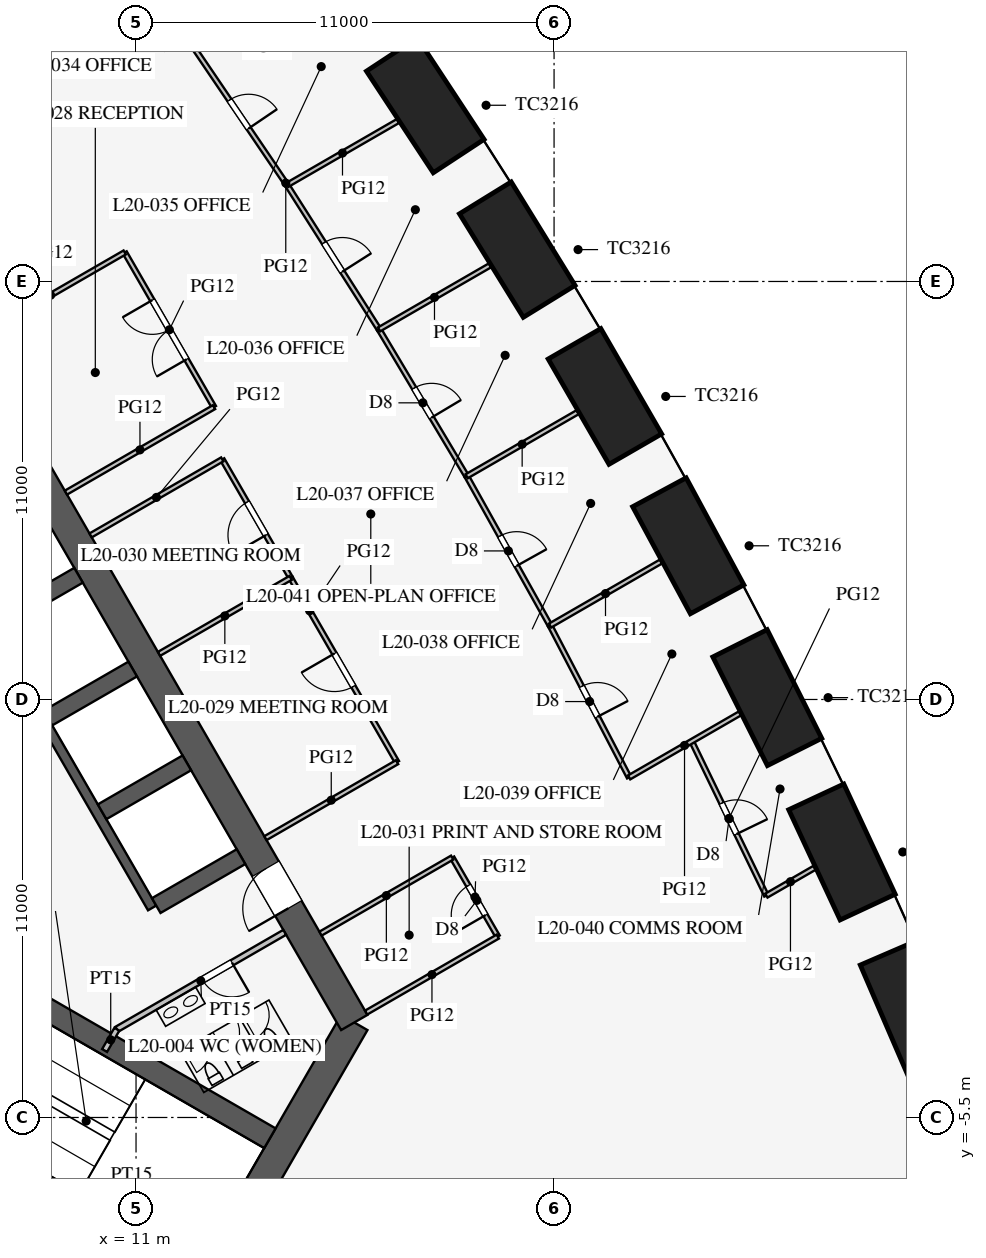
"""IFC4 building model, lengths in metres.
Left out: names, types, materials, properties, quantities, classifications, styles, units other than length and angle.
Written with IfcOpenShell. Run it as: python <this file> out.ifc"""

import sys

from ifc_helpers import new_model, si_unit, direction, frame, frame_2d, origin, origin_2d, place, context, subcontext, project, spatial, rectangle, extrude, element, fill, save


model = new_model("IFC4")
c1 = context("Model", 3, precision=1e-05, world=origin(), true_north=direction((0.0, 1.0)))
c2 = subcontext(c1, "Body", "Model", "MODEL_VIEW")
j1 = project(units=[si_unit("LENGTHUNIT", "METRE"), si_unit("PLANEANGLEUNIT", "RADIAN")], contexts=[c1])
p1 = place(None, origin())
s1 = spatial("IfcSite", under=j1, at=p1, CompositionType="ELEMENT")
p2 = place(p1, origin())
s2 = spatial("IfcBuilding", under=s1, at=p2, CompositionType="ELEMENT")
p3 = place(p2, frame((0.0, 0.0, 87.9)))
s3 = spatial("IfcBuildingStorey", under=s2, at=p3, CompositionType="ELEMENT", Elevation=87.9)
for number, where, z_axis, x_axis in (
    (1, (31.426, -2.641, 0.0), (0.0, 0.0, 1.0), (-0.396, 0.918, 0.0)),
    (2, (29.576, 1.487, 0.0), (0.0, 0.0, 1.0), (-0.423, 0.906, 0.0)),
    (3, (27.611, 5.549, 0.0), (0.0, 0.0, 1.0), (-0.449, 0.894, 0.0)),
    (4, (25.531, 9.544, 0.0), (0.0, 0.0, 1.0), (-0.475, 0.88, 0.0)),
    (5, (23.338, 13.474, 0.0), (0.0, 0.0, 1.0), (-0.5, 0.866, 0.0)),
    (6, (21.031, 17.339, 0.0), (0.0, 0.0, 1.0), (-0.525, 0.851, 0.0)),
    (7, (18.611, 21.137, 0.0), (0.0, 0.0, 1.0), (-0.549, 0.836, 0.0)),
):
    element("IfcColumn", number, at=place(p3, frame(where, z_axis=z_axis, x_axis=x_axis)), inside=s3, PredefinedType="COLUMN", context=c2, shape_type="SweptSolid", body=[
        extrude(rectangle(XDim=3.2, YDim=1.6, at=origin_2d()), origin(), (0.0, 0.0, 1.0), 4.2),
    ])
p4 = place(p3, frame((10.97, -13.0, 0.0), z_axis=(0.0, 0.0, 1.0), x_axis=(0.499995765644, 0.866027848477, 0.0)))
e8 = element("IfcWall", 8, at=p4, inside=s3, PredefinedType="SHEAR", context=c2, shape_type="SweptSolid", body=[
    extrude(rectangle(XDim=11.547, YDim=0.8, at=frame_2d((5.773, 0.0))), origin(), (0.0, 0.0, 1.0), 4.2),
])
p5 = place(p3, frame((16.743, -3.0, 0.0), z_axis=(0.0, 0.0, 1.0), x_axis=(-0.500002442456, 0.866023993627, 0.0)))
e9 = element("IfcWall", 9, at=p5, inside=s3, PredefinedType="SHEAR", context=c2, shape_type="SweptSolid", body=[
    extrude(rectangle(XDim=21.939, YDim=0.8, at=frame_2d((10.97, 0.0))), origin(), (0.0, 0.0, 1.0), 4.2),
])
p6 = place(p5, frame((17.27, 0.0, 0.0)))
e10 = element("IfcOpeningElement", 10, at=p6, cuts=e9, PredefinedType="OPENING", context=c2, shape_type="SweptSolid", body=[
    extrude(rectangle(XDim=1.2, YDim=2.1, at=frame_2d((0.6, 1.05))), frame((0.0, 0.41, 0.0), z_axis=(0.0, -1.0, 0.0), x_axis=(1.0, 0.0, 0.0)), (0.0, 0.0, 1.0), 0.82),
])
p7 = place(p5, frame((3.47, 0.0, 0.0)))
e11 = element("IfcOpeningElement", 11, at=p7, cuts=e9, PredefinedType="OPENING", context=c2, shape_type="SweptSolid", body=[
    extrude(rectangle(XDim=1.2, YDim=2.1, at=frame_2d((0.6, 1.05))), frame((0.0, 0.41, 0.0), z_axis=(0.0, -1.0, 0.0), x_axis=(1.0, 0.0, 0.0)), (0.0, 0.0, 1.0), 0.82),
])
p8 = place(p3, frame((11.424, 0.014, 0.0), z_axis=(0.0, 0.0, 1.0), x_axis=(-0.500001763848, 0.866024385424, 0.0)))
e12 = element("IfcWall", 12, at=p8, inside=s3, PredefinedType="SHEAR", context=c2, shape_type="SweptSolid", body=[
    extrude(rectangle(XDim=11.4, YDim=0.25, at=frame_2d((5.7, 0.0))), origin(), (0.0, 0.0, 1.0), 4.2),
])
for number, where, z_axis, x_axis in (
    (13, (11.532, 0.076, 0.0), (0.0, 0.0, 1.0), (0.866, 0.5, 0.0)),
    (14, (10.107, 2.544, 0.0), (0.0, 0.0, 1.0), (0.866, 0.5, 0.0)),
    (15, (8.682, 5.012, 0.0), (0.0, 0.0, 1.0), (0.866, 0.5, 0.0)),
    (16, (7.257, 7.481, 0.0), (0.0, 0.0, 1.0), (0.866, 0.5, 0.0)),
):
    element("IfcWall", number, at=place(p3, frame(where, z_axis=z_axis, x_axis=x_axis)), inside=s3, PredefinedType="SHEAR", context=c2, shape_type="SweptSolid", body=[
        extrude(rectangle(XDim=2.575, YDim=0.45, at=frame_2d((1.288, 0.0))), origin(), (0.0, 0.0, 1.0), 4.2),
    ])
for number, where, z_axis, x_axis in (
    (17, (4.638, -5.016, 0.0), (0.0, 0.0, 1.0), (0.866, -0.5, 0.0)),
    (18, (6.663, -1.509, 0.0), (0.0, 0.0, 1.0), (0.866, -0.5, 0.0)),
):
    element("IfcWall", number, at=place(p3, frame(where, z_axis=z_axis, x_axis=x_axis)), inside=s3, PredefinedType="SHEAR", context=c2, shape_type="SweptSolid", body=[
        extrude(rectangle(XDim=9.075, YDim=0.6, at=frame_2d((4.538, 0.0))), origin(), (0.0, 0.0, 1.0), 4.2),
    ])
p9 = place(p3, frame((10.495, -3.178, 0.0), z_axis=(0.0, 0.0, 1.0), x_axis=(0.86602216432, 0.500005610874, 0.0)))
e19 = element("IfcWall", 19, at=p9, inside=s3, PredefinedType="PARTITIONING", context=c2, shape_type="SweptSolid", body=[
    extrude(rectangle(XDim=5.1, YDim=0.15, at=frame_2d((2.55, 0.0))), origin(), (0.0, 0.0, 1.0), 3.95),
])
p10 = place(p9, frame((2.6, 0.0, 0.0)))
e20 = element("IfcOpeningElement", 20, at=p10, cuts=e19, PredefinedType="OPENING", context=c2, shape_type="SweptSolid", body=[
    extrude(rectangle(XDim=0.9, YDim=2.1, at=frame_2d((0.45, 1.05))), frame((0.0, 0.085, 0.0), z_axis=(0.0, -1.0, 0.0), x_axis=(1.0, 0.0, 0.0)), (0.0, 0.0, 1.0), 0.17),
])
p11 = place(p3, frame((10.495, -3.178, 0.0), z_axis=(0.0, 0.0, 1.0), x_axis=(-0.499842556608, -0.866116284689, 0.0)))
e21 = element("IfcWall", 21, at=p11, inside=s3, PredefinedType="PARTITIONING", context=c2, shape_type="SweptSolid", body=[
    extrude(rectangle(XDim=0.645, YDim=0.15, at=frame_2d((0.323, 0.0))), origin(), (0.0, 0.0, 1.0), 3.95),
])
p12 = place(p3, frame((13.052, 13.194, 0.0), z_axis=(0.0, 0.0, 1.0), x_axis=(-0.499977259774, 0.866038532462, 0.0)))
e22 = element("IfcWall", 22, at=p12, inside=s3, PredefinedType="PARTITIONING", context=c2, shape_type="SweptSolid", body=[
    extrude(rectangle(XDim=4.7, YDim=0.12, at=frame_2d((2.35, 0.0))), origin(), (0.0, 0.0, 1.0), 2.9),
])
p13 = place(p12, frame((1.45, 0.0, 0.15)))
e23 = element("IfcOpeningElement", 23, at=p13, cuts=e22, PredefinedType="OPENING", context=c2, shape_type="SweptSolid", body=[
    extrude(rectangle(XDim=1.8, YDim=2.1, at=frame_2d((0.9, 1.05))), frame((0.0, 0.07, 0.0), z_axis=(0.0, -1.0, 0.0), x_axis=(1.0, 0.0, 0.0)), (0.0, 0.0, 1.0), 0.14),
])
p14 = place(p3, frame((15.069, 8.7, 0.0), z_axis=(0.0, 0.0, 1.0), x_axis=(-0.500012057535, 0.866018442252, 0.0)))
e24 = element("IfcWall", 24, at=p14, inside=s3, PredefinedType="PARTITIONING", context=c2, shape_type="SweptSolid", body=[
    extrude(rectangle(XDim=3.6, YDim=0.12, at=frame_2d((1.8, 0.0))), origin(), (0.0, 0.0, 1.0), 2.9),
])
p15 = place(p14, frame((1.3, 0.0, 0.15)))
e25 = element("IfcOpeningElement", 25, at=p15, cuts=e24, PredefinedType="OPENING", context=c2, shape_type="SweptSolid", body=[
    extrude(rectangle(XDim=1.0, YDim=2.1, at=frame_2d((0.5, 1.05))), frame((0.0, 0.07, 0.0), z_axis=(0.0, -1.0, 0.0), x_axis=(1.0, 0.0, 0.0)), (0.0, 0.0, 1.0), 0.14),
])
p16 = place(p3, frame((20.519, -0.74, 0.0), z_axis=(0.0, 0.0, 1.0), x_axis=(-0.499957262057, 0.866050077142, 0.0)))
e26 = element("IfcWall", 26, at=p16, inside=s3, PredefinedType="PARTITIONING", context=c2, shape_type="SweptSolid", body=[
    extrude(rectangle(XDim=2.4, YDim=0.12, at=frame_2d((1.2, 0.0))), origin(), (0.0, 0.0, 1.0), 2.9),
])
p17 = place(p16, frame((0.65, 0.0, 0.15)))
e27 = element("IfcOpeningElement", 27, at=p17, cuts=e26, PredefinedType="OPENING", context=c2, shape_type="SweptSolid", body=[
    extrude(rectangle(XDim=0.9, YDim=2.1, at=frame_2d((0.45, 1.05))), frame((0.0, 0.07, 0.0), z_axis=(0.0, -1.0, 0.0), x_axis=(1.0, 0.0, 0.0)), (0.0, 0.0, 1.0), 0.14),
])
p18 = place(p3, frame((17.869, 3.85, 0.0), z_axis=(0.0, 0.0, 1.0), x_axis=(-0.500016814911, 0.866015695474, 0.0)))
e28 = element("IfcWall", 28, at=p18, inside=s3, PredefinedType="PARTITIONING", context=c2, shape_type="SweptSolid", body=[
    extrude(rectangle(XDim=5.6, YDim=0.12, at=frame_2d((2.8, 0.0))), origin(), (0.0, 0.0, 1.0), 2.9),
])
p19 = place(p18, frame((2.3, 0.0, 0.15)))
e29 = element("IfcOpeningElement", 29, at=p19, cuts=e28, PredefinedType="OPENING", context=c2, shape_type="SweptSolid", body=[
    extrude(rectangle(XDim=1.0, YDim=2.1, at=frame_2d((0.5, 1.05))), frame((0.0, 0.07, 0.0), z_axis=(0.0, -1.0, 0.0), x_axis=(1.0, 0.0, 0.0)), (0.0, 0.0, 1.0), 0.14),
])
p20 = place(p3, frame((9.805, 9.818, 0.0), z_axis=(0.0, 0.0, 1.0), x_axis=(0.866026010844, 0.49999894854, 0.0)))
e30 = element("IfcWall", 30, at=p20, inside=s3, PredefinedType="PARTITIONING", context=c2, shape_type="SweptSolid", body=[
    extrude(rectangle(XDim=4.0, YDim=0.12, at=frame_2d((2.0, 0.0))), origin(), (0.0, 0.0, 1.0), 2.9),
])
p21 = place(p3, frame((9.155, 10.944, 0.0), z_axis=(0.0, 0.0, 1.0), x_axis=(0.866017533419, 0.500013631625, 0.0)))
e31 = element("IfcWall", 31, at=p21, inside=s3, PredefinedType="PARTITIONING", context=c2, shape_type="SweptSolid", body=[
    extrude(rectangle(XDim=4.5, YDim=0.12, at=frame_2d((2.25, 0.0))), origin(), (0.0, 0.0, 1.0), 2.9),
])
p22 = place(p3, frame((6.805, 15.014, 0.0), z_axis=(0.0, 0.0, 1.0), x_axis=(0.866031096941, 0.499990139034, 0.0)))
e32 = element("IfcWall", 32, at=p22, inside=s3, PredefinedType="PARTITIONING", context=c2, shape_type="SweptSolid", body=[
    extrude(rectangle(XDim=4.5, YDim=0.12, at=frame_2d((2.25, 0.0))), origin(), (0.0, 0.0, 1.0), 2.9),
])
p23 = place(p3, frame((11.605, 6.7, 0.0), z_axis=(0.0, 0.0, 1.0), x_axis=(0.866026010844, 0.49999894854, 0.0)))
e33 = element("IfcWall", 33, at=p23, inside=s3, PredefinedType="PARTITIONING", context=c2, shape_type="SweptSolid", body=[
    extrude(rectangle(XDim=4.0, YDim=0.12, at=frame_2d((2.0, 0.0))), origin(), (0.0, 0.0, 1.0), 2.15),
])
for number, where, z_axis, x_axis in (
    (34, (17.055, -2.74, 0.0), (0.0, 0.0, 1.0), (0.866, 0.5, 0.0)),
    (35, (14.405, 1.85, 0.0), (0.0, 0.0, 1.0), (0.866, 0.5, 0.0)),
    (36, (15.855, -0.661, 0.0), (0.0, 0.0, 1.0), (0.866, 0.5, 0.0)),
):
    element("IfcWall", number, at=place(p3, frame(where, z_axis=z_axis, x_axis=x_axis)), inside=s3, PredefinedType="PARTITIONING", context=c2, shape_type="SweptSolid", body=[
        extrude(rectangle(XDim=4.0, YDim=0.12, at=frame_2d((2.0, 0.0))), origin(), (0.0, 0.0, 1.0), 2.9),
    ])
p24 = place(p3, frame((19.701, 11.374, 0.0), z_axis=(0.0, 0.0, 1.0), x_axis=(-0.512483962191, 0.858696796604, 0.0)))
e37 = element("IfcWall", 37, at=p24, inside=s3, PredefinedType="PARTITIONING", context=c2, shape_type="SweptSolid", body=[
    extrude(rectangle(XDim=4.5, YDim=0.12, at=frame_2d((2.25, 0.0))), origin(), (0.0, 0.0, 1.0), 2.9),
])
p25 = place(p24, frame((1.8, 0.0, 0.15)))
e38 = element("IfcOpeningElement", 38, at=p25, cuts=e37, PredefinedType="OPENING", context=c2, shape_type="SweptSolid", body=[
    extrude(rectangle(XDim=0.9, YDim=2.1, at=frame_2d((0.45, 1.05))), frame((0.0, 0.07, 0.0), z_axis=(0.0, -1.0, 0.0), x_axis=(1.0, 0.0, 0.0)), (0.0, 0.0, 1.0), 0.14),
])
p26 = place(p3, frame((17.395, 15.239, 0.0), z_axis=(0.0, 0.0, 1.0), x_axis=(-0.537243691336, 0.843427066272, 0.0)))
e39 = element("IfcWall", 39, at=p26, inside=s3, PredefinedType="PARTITIONING", context=c2, shape_type="SweptSolid", body=[
    extrude(rectangle(XDim=4.504, YDim=0.12, at=frame_2d((2.252, 0.0))), origin(), (0.0, 0.0, 1.0), 2.9),
])
p27 = place(p26, frame((1.8, 0.0, 0.15)))
e40 = element("IfcOpeningElement", 40, at=p27, cuts=e39, PredefinedType="OPENING", context=c2, shape_type="SweptSolid", body=[
    extrude(rectangle(XDim=0.9, YDim=2.1, at=frame_2d((0.45, 1.05))), frame((0.0, 0.07, 0.0), z_axis=(0.0, -1.0, 0.0), x_axis=(1.0, 0.0, 0.0)), (0.0, 0.0, 1.0), 0.14),
])
p28 = place(p3, frame((14.975, 19.038, 0.0), z_axis=(0.0, 0.0, 1.0), x_axis=(-0.561512004239, 0.827468591002, 0.0)))
e41 = element("IfcWall", 41, at=p28, inside=s3, PredefinedType="PARTITIONING", context=c2, shape_type="SweptSolid", body=[
    extrude(rectangle(XDim=4.512, YDim=0.12, at=frame_2d((2.256, 0.0))), origin(), (0.0, 0.0, 1.0), 2.9),
])
p29 = place(p28, frame((1.8, 0.0, 0.15)))
e42 = element("IfcOpeningElement", 42, at=p29, cuts=e41, PredefinedType="OPENING", context=c2, shape_type="SweptSolid", body=[
    extrude(rectangle(XDim=0.9, YDim=2.1, at=frame_2d((0.45, 1.05))), frame((0.0, 0.07, 0.0), z_axis=(0.0, -1.0, 0.0), x_axis=(1.0, 0.0, 0.0)), (0.0, 0.0, 1.0), 0.14),
])
p30 = place(p3, frame((27.587, 0.339, 0.0), z_axis=(0.0, 0.0, 1.0), x_axis=(-0.435857917556, 0.900015486369, 0.0)))
e43 = element("IfcWall", 43, at=p30, inside=s3, PredefinedType="PARTITIONING", context=c2, shape_type="SweptSolid", body=[
    extrude(rectangle(XDim=4.512, YDim=0.12, at=frame_2d((2.256, 0.0))), origin(), (0.0, 0.0, 1.0), 2.9),
])
p31 = place(p30, frame((1.8, 0.0, 0.15)))
e44 = element("IfcOpeningElement", 44, at=p31, cuts=e43, PredefinedType="OPENING", context=c2, shape_type="SweptSolid", body=[
    extrude(rectangle(XDim=0.9, YDim=2.1, at=frame_2d((0.45, 1.05))), frame((0.0, 0.07, 0.0), z_axis=(0.0, -1.0, 0.0), x_axis=(1.0, 0.0, 0.0)), (0.0, 0.0, 1.0), 0.14),
])
p32 = place(p3, frame((21.895, 7.445, 0.0), z_axis=(0.0, 0.0, 1.0), x_axis=(-0.487415216275, 0.87317031955, 0.0)))
e45 = element("IfcWall", 45, at=p32, inside=s3, PredefinedType="PARTITIONING", context=c2, shape_type="SweptSolid", body=[
    extrude(rectangle(XDim=4.5, YDim=0.12, at=frame_2d((2.25, 0.0))), origin(), (0.0, 0.0, 1.0), 2.9),
])
p33 = place(p32, frame((1.8, 0.0, 0.15)))
e46 = element("IfcOpeningElement", 46, at=p33, cuts=e45, PredefinedType="OPENING", context=c2, shape_type="SweptSolid", body=[
    extrude(rectangle(XDim=0.9, YDim=2.1, at=frame_2d((0.45, 1.05))), frame((0.0, 0.07, 0.0), z_axis=(0.0, -1.0, 0.0), x_axis=(1.0, 0.0, 0.0)), (0.0, 0.0, 1.0), 0.14),
])
p34 = place(p3, frame((23.975, 3.449, 0.0), z_axis=(0.0, 0.0, 1.0), x_axis=(-0.461810056307, 0.886978845235, 0.0)))
e47 = element("IfcWall", 47, at=p34, inside=s3, PredefinedType="PARTITIONING", context=c2, shape_type="SweptSolid", body=[
    extrude(rectangle(XDim=4.504, YDim=0.12, at=frame_2d((2.252, 0.0))), origin(), (0.0, 0.0, 1.0), 2.9),
])
p35 = place(p34, frame((1.8, 0.0, 0.15)))
e48 = element("IfcOpeningElement", 48, at=p35, cuts=e47, PredefinedType="OPENING", context=c2, shape_type="SweptSolid", body=[
    extrude(rectangle(XDim=0.9, YDim=2.1, at=frame_2d((0.45, 1.05))), frame((0.0, 0.07, 0.0), z_axis=(0.0, -1.0, 0.0), x_axis=(1.0, 0.0, 0.0)), (0.0, 0.0, 1.0), 0.14),
])
p36 = place(p3, frame((19.701, 11.374, 0.0), z_axis=(0.0, 0.0, 1.0), x_axis=(0.866014270972, 0.500019282102, 0.0)))
e49 = element("IfcWall", 49, at=p36, inside=s3, PredefinedType="PARTITIONING", context=c2, shape_type="SweptSolid", body=[
    extrude(rectangle(XDim=3.37, YDim=0.12, at=frame_2d((1.685, 0.0))), origin(), (0.0, 0.0, 1.0), 2.15),
])
p37 = place(p3, frame((17.395, 15.239, 0.0), z_axis=(0.0, 0.0, 1.0), x_axis=(0.865991297194, 0.500059069696, 0.0)))
e50 = element("IfcWall", 50, at=p37, inside=s3, PredefinedType="PARTITIONING", context=c2, shape_type="SweptSolid", body=[
    extrude(rectangle(XDim=3.369, YDim=0.12, at=frame_2d((1.685, 0.0))), origin(), (0.0, 0.0, 1.0), 2.15),
])
p38 = place(p3, frame((14.975, 19.038, 0.0), z_axis=(0.0, 0.0, 1.0), x_axis=(0.866039498442, 0.499975586543, 0.0)))
e51 = element("IfcWall", 51, at=p38, inside=s3, PredefinedType="PARTITIONING", context=c2, shape_type="SweptSolid", body=[
    extrude(rectangle(XDim=3.367, YDim=0.12, at=frame_2d((1.684, 0.0))), origin(), (0.0, 0.0, 1.0), 2.15),
])
p39 = place(p3, frame((27.587, 0.339, 0.0), z_axis=(0.0, 0.0, 1.0), x_axis=(0.865996700326, 0.500049712553, 0.0)))
e52 = element("IfcWall", 52, at=p39, inside=s3, PredefinedType="PARTITIONING", context=c2, shape_type="SweptSolid", body=[
    extrude(rectangle(XDim=1.464, YDim=0.12, at=frame_2d((0.732, 0.0))), origin(), (0.0, 0.0, 1.0), 2.15),
])
p40 = place(p3, frame((21.895, 7.445, 0.0), z_axis=(0.0, 0.0, 1.0), x_axis=(0.866022675988, 0.500004724652, 0.0)))
e53 = element("IfcWall", 53, at=p40, inside=s3, PredefinedType="PARTITIONING", context=c2, shape_type="SweptSolid", body=[
    extrude(rectangle(XDim=3.369, YDim=0.12, at=frame_2d((1.685, 0.0))), origin(), (0.0, 0.0, 1.0), 2.15),
])
p41 = place(p3, frame((23.975, 3.449, 0.0), z_axis=(0.0, 0.0, 1.0), x_axis=(0.866039498442, 0.499975586543, 0.0)))
e54 = element("IfcWall", 54, at=p41, inside=s3, PredefinedType="PARTITIONING", context=c2, shape_type="SweptSolid", body=[
    extrude(rectangle(XDim=3.367, YDim=0.12, at=frame_2d((1.684, 0.0))), origin(), (0.0, 0.0, 1.0), 2.15),
])
p42 = place(p10, frame((0.9, 0.0, 0.0), z_axis=(0.0, 0.0, 1.0), x_axis=(-1.0, 0.0, 0.0)))
e55 = element("IfcDoor", 55, at=p42, inside=s3, OperationType="SINGLE_SWING_LEFT", PredefinedType="DOOR", context=c2, shape_type="SweptSolid", body=[
    extrude(rectangle(XDim=0.9, YDim=2.1, at=frame_2d((0.45, 1.05))), frame((0.0, 0.025, 0.0), z_axis=(0.0, -1.0, 0.0), x_axis=(1.0, 0.0, 0.0)), (0.0, 0.0, 1.0), 0.05),
])
fill(e20, e55)
p43 = place(p7, origin())
e56 = element("IfcDoor", 56, at=p43, inside=s3, OperationType="SINGLE_SWING_LEFT", PredefinedType="DOOR", context=c2, shape_type="SweptSolid", body=[
    extrude(rectangle(XDim=1.2, YDim=2.1, at=frame_2d((0.6, 1.05))), frame((0.0, 0.025, 0.0), z_axis=(0.0, -1.0, 0.0), x_axis=(1.0, 0.0, 0.0)), (0.0, 0.0, 1.0), 0.05),
])
fill(e11, e56)
p44 = place(p13, origin())
e57 = element("IfcDoor", 57, at=p44, inside=s3, OperationType="DOUBLE_DOOR_SINGLE_SWING", PredefinedType="DOOR", context=c2, shape_type="SweptSolid", body=[
    extrude(rectangle(XDim=1.8, YDim=2.1, at=frame_2d((0.9, 1.05))), frame((0.0, 0.025, 0.0), z_axis=(0.0, -1.0, 0.0), x_axis=(1.0, 0.0, 0.0)), (0.0, 0.0, 1.0), 0.05),
])
fill(e23, e57)
p45 = place(p19, origin())
e58 = element("IfcDoor", 58, at=p45, inside=s3, OperationType="SINGLE_SWING_RIGHT", PredefinedType="DOOR", context=c2, shape_type="SweptSolid", body=[
    extrude(rectangle(XDim=1.0, YDim=2.1, at=frame_2d((0.5, 1.05))), frame((0.0, 0.025, 0.0), z_axis=(0.0, -1.0, 0.0), x_axis=(1.0, 0.0, 0.0)), (0.0, 0.0, 1.0), 0.05),
])
fill(e29, e58)
p46 = place(p15, origin())
e59 = element("IfcDoor", 59, at=p46, inside=s3, OperationType="SINGLE_SWING_LEFT", PredefinedType="DOOR", context=c2, shape_type="SweptSolid", body=[
    extrude(rectangle(XDim=1.0, YDim=2.1, at=frame_2d((0.5, 1.05))), frame((0.0, 0.025, 0.0), z_axis=(0.0, -1.0, 0.0), x_axis=(1.0, 0.0, 0.0)), (0.0, 0.0, 1.0), 0.05),
])
fill(e25, e59)
p47 = place(p17, origin())
e60 = element("IfcDoor", 60, at=p47, inside=s3, OperationType="SINGLE_SWING_LEFT", PredefinedType="DOOR", context=c2, shape_type="SweptSolid", body=[
    extrude(rectangle(XDim=0.9, YDim=2.1, at=frame_2d((0.45, 1.05))), frame((0.0, 0.025, 0.0), z_axis=(0.0, -1.0, 0.0), x_axis=(1.0, 0.0, 0.0)), (0.0, 0.0, 1.0), 0.05),
])
fill(e27, e60)
p48 = place(p29, frame((0.9, 0.0, 0.0), z_axis=(0.0, 0.0, 1.0), x_axis=(-1.0, 0.0, 0.0)))
e61 = element("IfcDoor", 61, at=p48, inside=s3, OperationType="SINGLE_SWING_RIGHT", PredefinedType="DOOR", context=c2, shape_type="SweptSolid", body=[
    extrude(rectangle(XDim=0.9, YDim=2.1, at=frame_2d((0.45, 1.05))), frame((0.0, 0.025, 0.0), z_axis=(0.0, -1.0, 0.0), x_axis=(1.0, 0.0, 0.0)), (0.0, 0.0, 1.0), 0.05),
])
fill(e42, e61)
p49 = place(p27, frame((0.9, 0.0, 0.0), z_axis=(0.0, 0.0, 1.0), x_axis=(-1.0, 0.0, 0.0)))
e62 = element("IfcDoor", 62, at=p49, inside=s3, OperationType="SINGLE_SWING_RIGHT", PredefinedType="DOOR", context=c2, shape_type="SweptSolid", body=[
    extrude(rectangle(XDim=0.9, YDim=2.1, at=frame_2d((0.45, 1.05))), frame((0.0, 0.025, 0.0), z_axis=(0.0, -1.0, 0.0), x_axis=(1.0, 0.0, 0.0)), (0.0, 0.0, 1.0), 0.05),
])
fill(e40, e62)
p50 = place(p25, frame((0.9, 0.0, 0.0), z_axis=(0.0, 0.0, 1.0), x_axis=(-1.0, 0.0, 0.0)))
e63 = element("IfcDoor", 63, at=p50, inside=s3, OperationType="SINGLE_SWING_RIGHT", PredefinedType="DOOR", context=c2, shape_type="SweptSolid", body=[
    extrude(rectangle(XDim=0.9, YDim=2.1, at=frame_2d((0.45, 1.05))), frame((0.0, 0.025, 0.0), z_axis=(0.0, -1.0, 0.0), x_axis=(1.0, 0.0, 0.0)), (0.0, 0.0, 1.0), 0.05),
])
fill(e38, e63)
p51 = place(p33, frame((0.9, 0.0, 0.0), z_axis=(0.0, 0.0, 1.0), x_axis=(-1.0, 0.0, 0.0)))
e64 = element("IfcDoor", 64, at=p51, inside=s3, OperationType="SINGLE_SWING_RIGHT", PredefinedType="DOOR", context=c2, shape_type="SweptSolid", body=[
    extrude(rectangle(XDim=0.9, YDim=2.1, at=frame_2d((0.45, 1.05))), frame((0.0, 0.025, 0.0), z_axis=(0.0, -1.0, 0.0), x_axis=(1.0, 0.0, 0.0)), (0.0, 0.0, 1.0), 0.05),
])
fill(e46, e64)
p52 = place(p35, frame((0.9, 0.0, 0.0), z_axis=(0.0, 0.0, 1.0), x_axis=(-1.0, 0.0, 0.0)))
e65 = element("IfcDoor", 65, at=p52, inside=s3, OperationType="SINGLE_SWING_RIGHT", PredefinedType="DOOR", context=c2, shape_type="SweptSolid", body=[
    extrude(rectangle(XDim=0.9, YDim=2.1, at=frame_2d((0.45, 1.05))), frame((0.0, 0.025, 0.0), z_axis=(0.0, -1.0, 0.0), x_axis=(1.0, 0.0, 0.0)), (0.0, 0.0, 1.0), 0.05),
])
fill(e48, e65)
p53 = place(p31, frame((0.9, 0.0, 0.0), z_axis=(0.0, 0.0, 1.0), x_axis=(-1.0, 0.0, 0.0)))
e66 = element("IfcDoor", 66, at=p53, inside=s3, OperationType="SINGLE_SWING_RIGHT", PredefinedType="DOOR", context=c2, shape_type="SweptSolid", body=[
    extrude(rectangle(XDim=0.9, YDim=2.1, at=frame_2d((0.45, 1.05))), frame((0.0, 0.025, 0.0), z_axis=(0.0, -1.0, 0.0), x_axis=(1.0, 0.0, 0.0)), (0.0, 0.0, 1.0), 0.05),
])
fill(e44, e66)
save(model, sys.argv[1])
